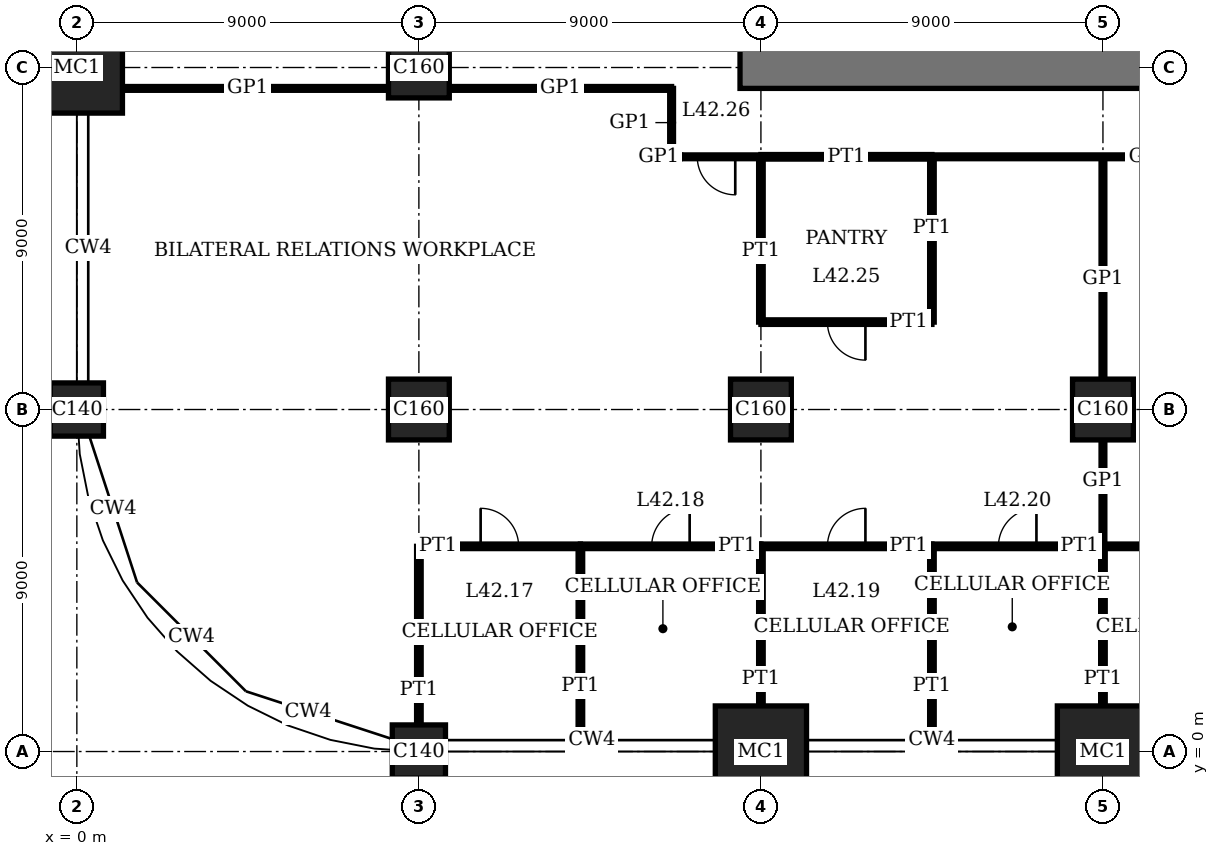
"""IFC4 building model, lengths in metres.
Left out: names, types, materials, properties, quantities, classifications, styles, units other than length and angle.
Written with IfcOpenShell. Run it as: python <this file> out.ifc"""

import sys

from ifc_helpers import new_model, si_unit, direction, frame, frame_2d, origin, origin_2d, place, context, subcontext, project, spatial, rectangle, extrude, element, fill, save


model = new_model("IFC4")
c1 = context("Model", 3, precision=1e-05, world=origin(), true_north=direction((0.0, 1.0)))
c2 = subcontext(c1, "Body", "Model", "MODEL_VIEW")
j1 = project(units=[si_unit("LENGTHUNIT", "METRE"), si_unit("PLANEANGLEUNIT", "RADIAN")], contexts=[c1])
p1 = place(None, origin())
s1 = spatial("IfcSite", under=j1, at=p1, CompositionType="ELEMENT")
p2 = place(p1, origin())
s2 = spatial("IfcBuilding", under=s1, at=p2, CompositionType="ELEMENT")
p3 = place(p2, frame((0.0, 0.0, 174.2)))
s3 = spatial("IfcBuildingStorey", under=s2, at=p3, CompositionType="ELEMENT", Elevation=174.2)
p4 = place(p3, frame((0.0, 9.0, 0.0), z_axis=(0.0, 0.0, 1.0), x_axis=(1.0, 0.0, 0.0)))
e1 = element("IfcColumn", 1, at=p4, inside=s3, PredefinedType="COLUMN", context=c2, shape_type="SweptSolid", body=[
    extrude(rectangle(XDim=1.4, YDim=1.4, at=origin_2d()), origin(), (0.0, 0.0, 1.0), 4.0),
])
p5 = place(p3, frame((0.0, 18.0, 0.0), z_axis=(0.0, 0.0, 1.0), x_axis=(1.0, 0.0, 0.0)))
e2 = element("IfcColumn", 2, at=p5, inside=s3, PredefinedType="COLUMN", context=c2, shape_type="SweptSolid", body=[
    extrude(rectangle(XDim=2.4, YDim=2.4, at=origin_2d()), origin(), (0.0, 0.0, 1.0), 4.0),
])
p6 = place(p3, frame((9.0, 0.0, 0.0), z_axis=(0.0, 0.0, 1.0), x_axis=(1.0, 0.0, 0.0)))
e3 = element("IfcColumn", 3, at=p6, inside=s3, PredefinedType="COLUMN", context=c2, shape_type="SweptSolid", body=[
    extrude(rectangle(XDim=1.4, YDim=1.4, at=origin_2d()), origin(), (0.0, 0.0, 1.0), 4.0),
])
for number, where, z_axis, x_axis in (
    (4, (9.0, 9.0, 0.0), (0.0, 0.0, 1.0), (1.0, 0.0, 0.0)),
    (5, (9.0, 18.0, 0.0), (0.0, 0.0, 1.0), (1.0, 0.0, 0.0)),
):
    element("IfcColumn", number, at=place(p3, frame(where, z_axis=z_axis, x_axis=x_axis)), inside=s3, PredefinedType="COLUMN", context=c2, shape_type="SweptSolid", body=[
        extrude(rectangle(XDim=1.6, YDim=1.6, at=origin_2d()), origin(), (0.0, 0.0, 1.0), 4.0),
    ])
p7 = place(p3, frame((18.0, 0.0, 0.0), z_axis=(0.0, 0.0, 1.0), x_axis=(1.0, 0.0, 0.0)))
e6 = element("IfcColumn", 6, at=p7, inside=s3, PredefinedType="COLUMN", context=c2, shape_type="SweptSolid", body=[
    extrude(rectangle(XDim=2.4, YDim=2.4, at=origin_2d()), origin(), (0.0, 0.0, 1.0), 4.0),
])
p8 = place(p3, frame((18.0, 9.0, 0.0), z_axis=(0.0, 0.0, 1.0), x_axis=(1.0, 0.0, 0.0)))
e7 = element("IfcColumn", 7, at=p8, inside=s3, PredefinedType="COLUMN", context=c2, shape_type="SweptSolid", body=[
    extrude(rectangle(XDim=1.6, YDim=1.6, at=origin_2d()), origin(), (0.0, 0.0, 1.0), 4.0),
])
p9 = place(p3, frame((27.0, 0.0, 0.0), z_axis=(0.0, 0.0, 1.0), x_axis=(1.0, 0.0, 0.0)))
e8 = element("IfcColumn", 8, at=p9, inside=s3, PredefinedType="COLUMN", context=c2, shape_type="SweptSolid", body=[
    extrude(rectangle(XDim=2.4, YDim=2.4, at=origin_2d()), origin(), (0.0, 0.0, 1.0), 4.0),
])
p10 = place(p3, frame((27.0, 9.0, 0.0), z_axis=(0.0, 0.0, 1.0), x_axis=(1.0, 0.0, 0.0)))
e9 = element("IfcColumn", 9, at=p10, inside=s3, PredefinedType="COLUMN", context=c2, shape_type="SweptSolid", body=[
    extrude(rectangle(XDim=1.6, YDim=1.6, at=origin_2d()), origin(), (0.0, 0.0, 1.0), 4.0),
])
p11 = place(p3, frame((17.45, 18.0, 0.0), z_axis=(0.0, 0.0, 1.0), x_axis=(1.0, 0.0, 0.0)))
e10 = element("IfcWall", 10, at=p11, inside=s3, PredefinedType="SHEAR", context=c2, shape_type="SweptSolid", body=[
    extrude(rectangle(XDim=28.1, YDim=1.1, at=frame_2d((14.05, 0.0))), origin(), (0.0, 0.0, 1.0), 4.0),
])
p12 = place(p11, frame((11.55, 0.0, 0.0)))
e11 = element("IfcOpeningElement", 11, at=p12, cuts=e10, PredefinedType="OPENING", context=c2, shape_type="SweptSolid", body=[
    extrude(rectangle(XDim=1.0, YDim=2.4, at=frame_2d((0.5, 1.2))), frame((0.0, 0.56, 0.0), z_axis=(0.0, -1.0, 0.0), x_axis=(1.0, 0.0, 0.0)), (0.0, 0.0, 1.0), 1.12),
])
p13 = place(p11, frame((16.55, 0.0, 0.0)))
e12 = element("IfcOpeningElement", 12, at=p13, cuts=e10, PredefinedType="OPENING", context=c2, shape_type="SweptSolid", body=[
    extrude(rectangle(XDim=1.0, YDim=2.4, at=frame_2d((0.5, 1.2))), frame((0.0, 0.56, 0.0), z_axis=(0.0, -1.0, 0.0), x_axis=(1.0, 0.0, 0.0)), (0.0, 0.0, 1.0), 1.12),
])
p14 = place(p11, frame((20.0, 0.0, 0.0)))
e13 = element("IfcOpeningElement", 13, at=p14, cuts=e10, PredefinedType="OPENING", context=c2, shape_type="SweptSolid", body=[
    extrude(rectangle(XDim=1.1, YDim=2.4, at=frame_2d((0.55, 1.2))), frame((0.0, 0.56, 0.0), z_axis=(0.0, -1.0, 0.0), x_axis=(1.0, 0.0, 0.0)), (0.0, 0.0, 1.0), 1.12),
])
p15 = place(p11, frame((24.05, 0.0, 0.0)))
e14 = element("IfcOpeningElement", 14, at=p15, cuts=e10, PredefinedType="OPENING", context=c2, shape_type="SweptSolid", body=[
    extrude(rectangle(XDim=1.0, YDim=2.4, at=frame_2d((0.5, 1.2))), frame((0.0, 0.56, 0.0), z_axis=(0.0, -1.0, 0.0), x_axis=(1.0, 0.0, 0.0)), (0.0, 0.0, 1.0), 1.12),
])
p16 = place(p3, frame((9.0, 5.4, 0.0), z_axis=(0.0, 0.0, 1.0), x_axis=(1.0, 0.0, 0.0)))
e15 = element("IfcWall", 15, at=p16, inside=s3, PredefinedType="PARTITIONING", context=c2, shape_type="SweptSolid", body=[
    extrude(rectangle(XDim=4.25, YDim=0.12, at=frame_2d((2.125, 0.0))), origin(), (0.0, 0.0, 1.0), 3.75),
])
p17 = place(p16, frame((1.625, 0.0, 0.0)))
e16 = element("IfcOpeningElement", 16, at=p17, cuts=e15, PredefinedType="OPENING", context=c2, shape_type="SweptSolid", body=[
    extrude(rectangle(XDim=1.0, YDim=2.4, at=frame_2d((0.5, 1.2))), frame((0.0, 0.07, 0.0), z_axis=(0.0, -1.0, 0.0), x_axis=(1.0, 0.0, 0.0)), (0.0, 0.0, 1.0), 0.14),
])
p18 = place(p3, frame((13.25, 5.4, 0.0), z_axis=(0.0, 0.0, 1.0), x_axis=(1.0, 0.0, 0.0)))
e17 = element("IfcWall", 17, at=p18, inside=s3, PredefinedType="PARTITIONING", context=c2, shape_type="SweptSolid", body=[
    extrude(rectangle(XDim=4.75, YDim=0.12, at=frame_2d((2.375, 0.0))), origin(), (0.0, 0.0, 1.0), 3.75),
])
p19 = place(p18, frame((1.875, 0.0, 0.0)))
e18 = element("IfcOpeningElement", 18, at=p19, cuts=e17, PredefinedType="OPENING", context=c2, shape_type="SweptSolid", body=[
    extrude(rectangle(XDim=1.0, YDim=2.4, at=frame_2d((0.5, 1.2))), frame((0.0, 0.07, 0.0), z_axis=(0.0, -1.0, 0.0), x_axis=(1.0, 0.0, 0.0)), (0.0, 0.0, 1.0), 0.14),
])
p20 = place(p3, frame((18.0, 5.4, 0.0), z_axis=(0.0, 0.0, 1.0), x_axis=(1.0, 0.0, 0.0)))
e19 = element("IfcWall", 19, at=p20, inside=s3, PredefinedType="PARTITIONING", context=c2, shape_type="SweptSolid", body=[
    extrude(rectangle(XDim=4.5, YDim=0.12, at=frame_2d((2.25, 0.0))), origin(), (0.0, 0.0, 1.0), 3.75),
])
p21 = place(p20, frame((1.75, 0.0, 0.0)))
e20 = element("IfcOpeningElement", 20, at=p21, cuts=e19, PredefinedType="OPENING", context=c2, shape_type="SweptSolid", body=[
    extrude(rectangle(XDim=1.0, YDim=2.4, at=frame_2d((0.5, 1.2))), frame((0.0, 0.07, 0.0), z_axis=(0.0, -1.0, 0.0), x_axis=(1.0, 0.0, 0.0)), (0.0, 0.0, 1.0), 0.14),
])
p22 = place(p3, frame((22.5, 5.4, 0.0), z_axis=(0.0, 0.0, 1.0), x_axis=(1.0, 0.0, 0.0)))
e21 = element("IfcWall", 21, at=p22, inside=s3, PredefinedType="PARTITIONING", context=c2, shape_type="SweptSolid", body=[
    extrude(rectangle(XDim=4.5, YDim=0.12, at=frame_2d((2.25, 0.0))), origin(), (0.0, 0.0, 1.0), 3.75),
])
p23 = place(p22, frame((1.75, 0.0, 0.0)))
e22 = element("IfcOpeningElement", 22, at=p23, cuts=e21, PredefinedType="OPENING", context=c2, shape_type="SweptSolid", body=[
    extrude(rectangle(XDim=1.0, YDim=2.4, at=frame_2d((0.5, 1.2))), frame((0.0, 0.07, 0.0), z_axis=(0.0, -1.0, 0.0), x_axis=(1.0, 0.0, 0.0)), (0.0, 0.0, 1.0), 0.14),
])
p24 = place(p3, frame((27.0, 5.4, 0.0), z_axis=(0.0, 0.0, 1.0), x_axis=(1.0, 0.0, 0.0)))
e23 = element("IfcWall", 23, at=p24, inside=s3, PredefinedType="PARTITIONING", context=c2, shape_type="SweptSolid", body=[
    extrude(rectangle(XDim=4.5, YDim=0.12, at=frame_2d((2.25, 0.0))), origin(), (0.0, 0.0, 1.0), 3.75),
])
p25 = place(p24, frame((1.75, 0.0, 0.0)))
e24 = element("IfcOpeningElement", 24, at=p25, cuts=e23, PredefinedType="OPENING", context=c2, shape_type="SweptSolid", body=[
    extrude(rectangle(XDim=1.0, YDim=2.4, at=frame_2d((0.5, 1.2))), frame((0.0, 0.07, 0.0), z_axis=(0.0, -1.0, 0.0), x_axis=(1.0, 0.0, 0.0)), (0.0, 0.0, 1.0), 0.14),
])
p26 = place(p3, frame((18.0, 11.3, 0.0), z_axis=(0.0, 0.0, 1.0), x_axis=(1.0, 0.0, 0.0)))
e25 = element("IfcWall", 25, at=p26, inside=s3, PredefinedType="PARTITIONING", context=c2, shape_type="SweptSolid", body=[
    extrude(rectangle(XDim=4.5, YDim=0.12, at=frame_2d((2.25, 0.0))), origin(), (0.0, 0.0, 1.0), 3.75),
])
p27 = place(p26, frame((1.75, 0.0, 0.0)))
e26 = element("IfcOpeningElement", 26, at=p27, cuts=e25, PredefinedType="OPENING", context=c2, shape_type="SweptSolid", body=[
    extrude(rectangle(XDim=1.0, YDim=2.4, at=frame_2d((0.5, 1.2))), frame((0.0, 0.07, 0.0), z_axis=(0.0, -1.0, 0.0), x_axis=(1.0, 0.0, 0.0)), (0.0, 0.0, 1.0), 0.14),
])
p28 = place(p3, frame((18.0, 15.65, 0.0), z_axis=(0.0, 0.0, 1.0), x_axis=(1.0, 0.0, 0.0)))
e27 = element("IfcWall", 27, at=p28, inside=s3, PredefinedType="PARTITIONING", context=c2, shape_type="SweptSolid", body=[
    extrude(rectangle(XDim=4.5, YDim=0.12, at=frame_2d((2.25, 0.0))), origin(), (0.0, 0.0, 1.0), 3.75),
])
p29 = place(p3, frame((15.65, 15.65, 0.0), z_axis=(0.0, 0.0, 1.0), x_axis=(1.0, 0.0, 0.0)))
e28 = element("IfcWall", 28, at=p29, inside=s3, PredefinedType="PARTITIONING", context=c2, shape_type="SweptSolid", body=[
    extrude(rectangle(XDim=2.35, YDim=0.1, at=frame_2d((1.175, 0.0))), origin(), (0.0, 0.0, 1.0), 3.75),
])
p30 = place(p29, frame((0.675, 0.0, 0.0)))
e29 = element("IfcOpeningElement", 29, at=p30, cuts=e28, PredefinedType="OPENING", context=c2, shape_type="SweptSolid", body=[
    extrude(rectangle(XDim=1.0, YDim=2.4, at=frame_2d((0.5, 1.2))), frame((0.0, 0.06, 0.0), z_axis=(0.0, -1.0, 0.0), x_axis=(1.0, 0.0, 0.0)), (0.0, 0.0, 1.0), 0.12),
])
p31 = place(p3, frame((22.5, 15.65, 0.0), z_axis=(0.0, 0.0, 1.0), x_axis=(1.0, 0.0, 0.0)))
e30 = element("IfcWall", 30, at=p31, inside=s3, PredefinedType="PARTITIONING", context=c2, shape_type="SweptSolid", body=[
    extrude(rectangle(XDim=24.85, YDim=0.1, at=frame_2d((12.425, 0.0))), origin(), (0.0, 0.0, 1.0), 3.75),
])
p32 = place(p31, frame((11.925, 0.0, 0.0)))
e31 = element("IfcOpeningElement", 31, at=p32, cuts=e30, PredefinedType="OPENING", context=c2, shape_type="SweptSolid", body=[
    extrude(rectangle(XDim=1.0, YDim=2.4, at=frame_2d((0.5, 1.2))), frame((0.0, 0.06, 0.0), z_axis=(0.0, -1.0, 0.0), x_axis=(1.0, 0.0, 0.0)), (0.0, 0.0, 1.0), 0.12),
])
p33 = place(p3, frame((1.2, 17.45, 0.0), z_axis=(0.0, 0.0, 1.0), x_axis=(1.0, 0.0, 0.0)))
e32 = element("IfcWall", 32, at=p33, inside=s3, PredefinedType="PARTITIONING", context=c2, shape_type="SweptSolid", body=[
    extrude(rectangle(XDim=7.0, YDim=0.1, at=frame_2d((3.5, 0.0))), origin(), (0.0, 0.0, 1.0), 3.75),
])
p34 = place(p3, frame((9.8, 17.45, 0.0), z_axis=(0.0, 0.0, 1.0), x_axis=(1.0, 0.0, 0.0)))
e33 = element("IfcWall", 33, at=p34, inside=s3, PredefinedType="PARTITIONING", context=c2, shape_type="SweptSolid", body=[
    extrude(rectangle(XDim=5.85, YDim=0.1, at=frame_2d((2.925, 0.0))), origin(), (0.0, 0.0, 1.0), 3.75),
])
p35 = place(p3, frame((9.0, 0.7, 0.0), z_axis=(0.0, 0.0, 1.0), x_axis=(0.0, 1.0, 0.0)))
e34 = element("IfcWall", 34, at=p35, inside=s3, PredefinedType="PARTITIONING", context=c2, shape_type="SweptSolid", body=[
    extrude(rectangle(XDim=4.7, YDim=0.12, at=frame_2d((2.35, 0.0))), origin(), (0.0, 0.0, 1.0), 3.05),
])
p36 = place(p3, frame((13.25, 0.31, 0.0), z_axis=(0.0, 0.0, 1.0), x_axis=(0.0, 1.0, 0.0)))
e35 = element("IfcWall", 35, at=p36, inside=s3, PredefinedType="PARTITIONING", context=c2, shape_type="SweptSolid", body=[
    extrude(rectangle(XDim=5.09, YDim=0.12, at=frame_2d((2.545, 0.0))), origin(), (0.0, 0.0, 1.0), 3.75),
])
p37 = place(p3, frame((15.65, 15.65, 0.0), z_axis=(0.0, 0.0, 1.0), x_axis=(0.0, 1.0, 0.0)))
e36 = element("IfcWall", 36, at=p37, inside=s3, PredefinedType="PARTITIONING", context=c2, shape_type="SweptSolid", body=[
    extrude(rectangle(XDim=1.8, YDim=0.1, at=frame_2d((0.9, 0.0))), origin(), (0.0, 0.0, 1.0), 3.75),
])
p38 = place(p3, frame((18.0, 1.2, 0.0), z_axis=(0.0, 0.0, 1.0), x_axis=(0.0, 1.0, 0.0)))
e37 = element("IfcWall", 37, at=p38, inside=s3, PredefinedType="PARTITIONING", context=c2, shape_type="SweptSolid", body=[
    extrude(rectangle(XDim=4.2, YDim=0.12, at=frame_2d((2.1, 0.0))), origin(), (0.0, 0.0, 1.0), 3.05),
])
p39 = place(p3, frame((18.0, 11.3, 0.0), z_axis=(0.0, 0.0, 1.0), x_axis=(0.0, 1.0, 0.0)))
e38 = element("IfcWall", 38, at=p39, inside=s3, PredefinedType="PARTITIONING", context=c2, shape_type="SweptSolid", body=[
    extrude(rectangle(XDim=4.35, YDim=0.12, at=frame_2d((2.175, 0.0))), origin(), (0.0, 0.0, 1.0), 3.05),
])
p40 = place(p3, frame((22.5, 0.31, 0.0), z_axis=(0.0, 0.0, 1.0), x_axis=(0.0, 1.0, 0.0)))
e39 = element("IfcWall", 39, at=p40, inside=s3, PredefinedType="PARTITIONING", context=c2, shape_type="SweptSolid", body=[
    extrude(rectangle(XDim=5.09, YDim=0.12, at=frame_2d((2.545, 0.0))), origin(), (0.0, 0.0, 1.0), 3.75),
])
p41 = place(p3, frame((22.5, 11.3, 0.0), z_axis=(0.0, 0.0, 1.0), x_axis=(0.0, 1.0, 0.0)))
e40 = element("IfcWall", 40, at=p41, inside=s3, PredefinedType="PARTITIONING", context=c2, shape_type="SweptSolid", body=[
    extrude(rectangle(XDim=4.35, YDim=0.12, at=frame_2d((2.175, 0.0))), origin(), (0.0, 0.0, 1.0), 3.75),
])
p42 = place(p3, frame((27.0, 1.2, 0.0), z_axis=(0.0, 0.0, 1.0), x_axis=(0.0, 1.0, 0.0)))
e41 = element("IfcWall", 41, at=p42, inside=s3, PredefinedType="PARTITIONING", context=c2, shape_type="SweptSolid", body=[
    extrude(rectangle(XDim=4.2, YDim=0.12, at=frame_2d((2.1, 0.0))), origin(), (0.0, 0.0, 1.0), 3.05),
])
p43 = place(p3, frame((27.0, 5.4, 0.0), z_axis=(0.0, 0.0, 1.0), x_axis=(0.0, 1.0, 0.0)))
e42 = element("IfcWall", 42, at=p43, inside=s3, PredefinedType="PARTITIONING", context=c2, shape_type="SweptSolid", body=[
    extrude(rectangle(XDim=2.8, YDim=0.1, at=frame_2d((1.4, 0.0))), origin(), (0.0, 0.0, 1.0), 3.05),
])
p44 = place(p3, frame((27.0, 9.8, 0.0), z_axis=(0.0, 0.0, 1.0), x_axis=(0.0, 1.0, 0.0)))
e43 = element("IfcWall", 43, at=p44, inside=s3, PredefinedType="PARTITIONING", context=c2, shape_type="SweptSolid", body=[
    extrude(rectangle(XDim=5.85, YDim=0.1, at=frame_2d((2.925, 0.0))), origin(), (0.0, 0.0, 1.0), 3.05),
])
p45 = place(p17, origin())
e44 = element("IfcDoor", 44, at=p45, inside=s3, OperationType="SINGLE_SWING_RIGHT", PredefinedType="DOOR", context=c2, shape_type="SweptSolid", body=[
    extrude(rectangle(XDim=1.0, YDim=2.4, at=frame_2d((0.5, 1.2))), frame((0.0, 0.025, 0.0), z_axis=(0.0, -1.0, 0.0), x_axis=(1.0, 0.0, 0.0)), (0.0, 0.0, 1.0), 0.05),
])
fill(e16, e44)
p46 = place(p19, origin())
e45 = element("IfcDoor", 45, at=p46, inside=s3, OperationType="SINGLE_SWING_LEFT", PredefinedType="DOOR", context=c2, shape_type="SweptSolid", body=[
    extrude(rectangle(XDim=1.0, YDim=2.4, at=frame_2d((0.5, 1.2))), frame((0.0, 0.025, 0.0), z_axis=(0.0, -1.0, 0.0), x_axis=(1.0, 0.0, 0.0)), (0.0, 0.0, 1.0), 0.05),
])
fill(e18, e45)
p47 = place(p21, origin())
e46 = element("IfcDoor", 46, at=p47, inside=s3, OperationType="SINGLE_SWING_LEFT", PredefinedType="DOOR", context=c2, shape_type="SweptSolid", body=[
    extrude(rectangle(XDim=1.0, YDim=2.4, at=frame_2d((0.5, 1.2))), frame((0.0, 0.025, 0.0), z_axis=(0.0, -1.0, 0.0), x_axis=(1.0, 0.0, 0.0)), (0.0, 0.0, 1.0), 0.05),
])
fill(e20, e46)
p48 = place(p23, origin())
e47 = element("IfcDoor", 47, at=p48, inside=s3, OperationType="SINGLE_SWING_LEFT", PredefinedType="DOOR", context=c2, shape_type="SweptSolid", body=[
    extrude(rectangle(XDim=1.0, YDim=2.4, at=frame_2d((0.5, 1.2))), frame((0.0, 0.025, 0.0), z_axis=(0.0, -1.0, 0.0), x_axis=(1.0, 0.0, 0.0)), (0.0, 0.0, 1.0), 0.05),
])
fill(e22, e47)
p49 = place(p27, origin())
e48 = element("IfcDoor", 48, at=p49, inside=s3, OperationType="SINGLE_SWING_RIGHT", PredefinedType="DOOR", context=c2, shape_type="SweptSolid", body=[
    extrude(rectangle(XDim=1.0, YDim=2.4, at=frame_2d((0.5, 1.2))), frame((0.0, 0.025, 0.0), z_axis=(0.0, -1.0, 0.0), x_axis=(1.0, 0.0, 0.0)), (0.0, 0.0, 1.0), 0.05),
])
fill(e26, e48)
p50 = place(p30, origin())
e49 = element("IfcDoor", 49, at=p50, inside=s3, OperationType="SINGLE_SWING_RIGHT", PredefinedType="DOOR", context=c2, shape_type="SweptSolid", body=[
    extrude(rectangle(XDim=1.0, YDim=2.4, at=frame_2d((0.5, 1.2))), frame((0.0, 0.02, 0.0), z_axis=(0.0, -1.0, 0.0), x_axis=(1.0, 0.0, 0.0)), (0.0, 0.0, 1.0), 0.04),
])
fill(e29, e49)
save(model, sys.argv[1])
